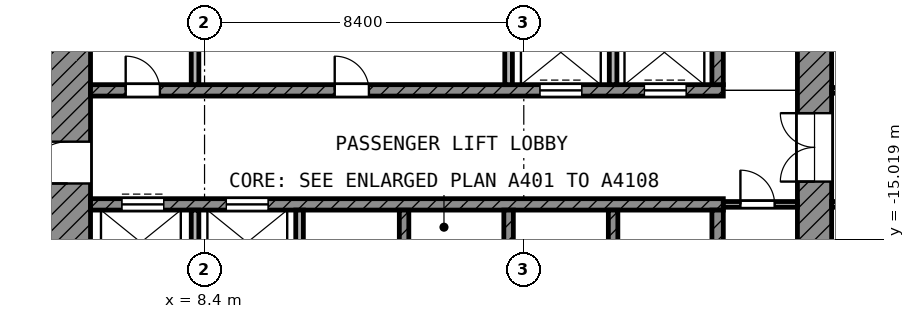
"""IFC4 building model, lengths in metres.
Left out: names, types, materials, properties, quantities, classifications, styles, units other than length and angle.
Written with IfcOpenShell. Run it as: python <this file> out.ifc"""

import sys

from ifc_helpers import new_model, si_unit, direction, frame, frame_2d, origin, place, context, subcontext, project, spatial, rectangle, extrude, element, fill, save


model = new_model("IFC4")
c1 = context("Model", 3, precision=1e-05, world=origin(), true_north=direction((0.0, 1.0)))
c2 = subcontext(c1, "Body", "Model", "MODEL_VIEW")
j1 = project(units=[si_unit("LENGTHUNIT", "METRE"), si_unit("PLANEANGLEUNIT", "RADIAN")], contexts=[c1])
p1 = place(None, origin())
s1 = spatial("IfcSite", under=j1, at=p1, CompositionType="ELEMENT")
p2 = place(p1, origin())
s2 = spatial("IfcBuilding", under=s1, at=p2, CompositionType="ELEMENT")
p3 = place(p2, frame((0.0, 0.0, 208.8)))
s3 = spatial("IfcBuildingStorey", under=s2, at=p3, CompositionType="ELEMENT", Elevation=208.8)
p4 = place(p3, frame((4.8, -24.9, 0.0), z_axis=(0.0, 0.0, 1.0), x_axis=(0.0, 1.0, 0.0)))
e1 = element("IfcWall", 1, at=p4, inside=s3, PredefinedType="SHEAR", context=c2, shape_type="SweptSolid", body=[
    extrude(rectangle(XDim=19.5, YDim=1.2, at=frame_2d((9.75, 0.0))), origin(), (0.0, 0.0, 1.0), 3.7),
])
p5 = place(p4, frame((11.35, 0.0, 0.0)))
e2 = element("IfcOpeningElement", 2, at=p5, cuts=e1, PredefinedType="OPENING", context=c2, shape_type="SweptSolid", body=[
    extrude(rectangle(XDim=1.1, YDim=2.1, at=frame_2d((0.55, 1.05))), frame((0.0, 0.61, 0.0), z_axis=(0.0, -1.0, 0.0), x_axis=(1.0, 0.0, 0.0)), (0.0, 0.0, 1.0), 1.22),
])
p6 = place(p4, frame((2.05, 0.0, 0.0)))
e3 = element("IfcOpeningElement", 3, at=p6, cuts=e1, PredefinedType="OPENING", context=c2, shape_type="SweptSolid", body=[
    extrude(rectangle(XDim=1.1, YDim=2.1, at=frame_2d((0.55, 1.05))), frame((0.0, 0.61, 0.0), z_axis=(0.0, -1.0, 0.0), x_axis=(1.0, 0.0, 0.0)), (0.0, 0.0, 1.0), 1.22),
])
p7 = place(p3, frame((24.45, -24.0, 0.0), z_axis=(0.0, 0.0, 1.0), x_axis=(0.0, 1.0, 0.0)))
e4 = element("IfcWall", 4, at=p7, inside=s3, PredefinedType="SHEAR", context=c2, shape_type="SweptSolid", body=[
    extrude(rectangle(XDim=18.6, YDim=0.9, at=frame_2d((9.3, 0.0))), origin(), (0.0, 0.0, 1.0), 3.7),
])
p8 = place(p7, frame((10.5, 0.0, 0.0)))
e5 = element("IfcOpeningElement", 5, at=p8, cuts=e4, PredefinedType="OPENING", context=c2, shape_type="SweptSolid", body=[
    extrude(rectangle(XDim=1.8, YDim=2.1, at=frame_2d((0.9, 1.05))), frame((0.0, 0.46, 0.0), z_axis=(0.0, -1.0, 0.0), x_axis=(1.0, 0.0, 0.0)), (0.0, 0.0, 1.0), 0.92),
])
p9 = place(p3, frame((5.4, -11.1, 0.0), z_axis=(0.0, 0.0, 1.0), x_axis=(1.0, 0.0, 0.0)))
e6 = element("IfcWall", 6, at=p9, inside=s3, PredefinedType="SHEAR", context=c2, shape_type="SweptSolid", body=[
    extrude(rectangle(XDim=16.65, YDim=0.3, at=frame_2d((8.325, 0.0))), origin(), (0.0, 0.0, 1.0), 3.7),
])
p10 = place(p9, frame((11.825, 0.0, 0.0)))
e7 = element("IfcOpeningElement", 7, at=p10, cuts=e6, PredefinedType="OPENING", context=c2, shape_type="SweptSolid", body=[
    extrude(rectangle(XDim=1.1, YDim=2.1, at=frame_2d((0.55, 1.05))), frame((0.0, 0.16, 0.0), z_axis=(0.0, -1.0, 0.0), x_axis=(1.0, 0.0, 0.0)), (0.0, 0.0, 1.0), 0.32),
])
p11 = place(p9, frame((14.575, 0.0, 0.0)))
e8 = element("IfcOpeningElement", 8, at=p11, cuts=e6, PredefinedType="OPENING", context=c2, shape_type="SweptSolid", body=[
    extrude(rectangle(XDim=1.1, YDim=2.1, at=frame_2d((0.55, 1.05))), frame((0.0, 0.16, 0.0), z_axis=(0.0, -1.0, 0.0), x_axis=(1.0, 0.0, 0.0)), (0.0, 0.0, 1.0), 0.32),
])
p12 = place(p9, frame((0.925, 0.0, 0.0)))
e9 = element("IfcOpeningElement", 9, at=p12, cuts=e6, PredefinedType="OPENING", context=c2, shape_type="SweptSolid", body=[
    extrude(rectangle(XDim=0.9, YDim=2.1, at=frame_2d((0.45, 1.05))), frame((0.0, 0.16, 0.0), z_axis=(0.0, -1.0, 0.0), x_axis=(1.0, 0.0, 0.0)), (0.0, 0.0, 1.0), 0.32),
])
p13 = place(p9, frame((6.425, 0.0, 0.0)))
e10 = element("IfcOpeningElement", 10, at=p13, cuts=e6, PredefinedType="OPENING", context=c2, shape_type="SweptSolid", body=[
    extrude(rectangle(XDim=0.9, YDim=2.1, at=frame_2d((0.45, 1.05))), frame((0.0, 0.16, 0.0), z_axis=(0.0, -1.0, 0.0), x_axis=(1.0, 0.0, 0.0)), (0.0, 0.0, 1.0), 0.32),
])
p14 = place(p3, frame((5.4, -14.1, 0.0), z_axis=(0.0, 0.0, 1.0), x_axis=(1.0, 0.0, 0.0)))
e11 = element("IfcWall", 11, at=p14, inside=s3, PredefinedType="SHEAR", context=c2, shape_type="SweptSolid", body=[
    extrude(rectangle(XDim=16.65, YDim=0.3, at=frame_2d((8.325, 0.0))), origin(), (0.0, 0.0, 1.0), 3.7),
])
p15 = place(p14, frame((0.825, 0.0, 0.0)))
e12 = element("IfcOpeningElement", 12, at=p15, cuts=e11, PredefinedType="OPENING", context=c2, shape_type="SweptSolid", body=[
    extrude(rectangle(XDim=1.1, YDim=2.1, at=frame_2d((0.55, 1.05))), frame((0.0, 0.16, 0.0), z_axis=(0.0, -1.0, 0.0), x_axis=(1.0, 0.0, 0.0)), (0.0, 0.0, 1.0), 0.32),
])
p16 = place(p14, frame((3.575, 0.0, 0.0)))
e13 = element("IfcOpeningElement", 13, at=p16, cuts=e11, PredefinedType="OPENING", context=c2, shape_type="SweptSolid", body=[
    extrude(rectangle(XDim=1.1, YDim=2.1, at=frame_2d((0.55, 1.05))), frame((0.0, 0.16, 0.0), z_axis=(0.0, -1.0, 0.0), x_axis=(1.0, 0.0, 0.0)), (0.0, 0.0, 1.0), 0.32),
])
p17 = place(p3, frame((21.9, -10.95, 0.0), z_axis=(0.0, 0.0, 1.0), x_axis=(0.0, 1.0, 0.0)))
e14 = element("IfcWall", 14, at=p17, inside=s3, PredefinedType="SHEAR", context=c2, shape_type="SweptSolid", body=[
    extrude(rectangle(XDim=2.35, YDim=0.3, at=frame_2d((1.175, 0.0))), origin(), (0.0, 0.0, 1.0), 3.7),
])
p18 = place(p3, frame((21.9, -16.6, 0.0), z_axis=(0.0, 0.0, 1.0), x_axis=(0.0, 1.0, 0.0)))
e15 = element("IfcWall", 15, at=p18, inside=s3, PredefinedType="SHEAR", context=c2, shape_type="SweptSolid", body=[
    extrude(rectangle(XDim=2.35, YDim=0.3, at=frame_2d((1.175, 0.0))), origin(), (0.0, 0.0, 1.0), 3.7),
])
for number, where, z_axis, x_axis in (
    (16, (8.15, -10.95, 0.0), (0.0, 0.0, 1.0), (0.0, 1.0, 0.0)),
    (17, (16.4, -10.95, 0.0), (0.0, 0.0, 1.0), (0.0, 1.0, 0.0)),
    (18, (19.15, -10.95, 0.0), (0.0, 0.0, 1.0), (0.0, 1.0, 0.0)),
):
    element("IfcWall", number, at=place(p3, frame(where, z_axis=z_axis, x_axis=x_axis)), inside=s3, PredefinedType="PARTITIONING", context=c2, shape_type="SweptSolid", body=[
        extrude(rectangle(XDim=2.35, YDim=0.2, at=frame_2d((1.175, 0.0))), origin(), (0.0, 0.0, 1.0), 3.7),
    ])
for number, where, z_axis, x_axis in (
    (19, (8.15, -16.6, 0.0), (0.0, 0.0, 1.0), (0.0, 1.0, 0.0)),
    (20, (10.9, -16.6, 0.0), (0.0, 0.0, 1.0), (0.0, 1.0, 0.0)),
):
    element("IfcWall", number, at=place(p3, frame(where, z_axis=z_axis, x_axis=x_axis)), inside=s3, PredefinedType="PARTITIONING", context=c2, shape_type="SweptSolid", body=[
        extrude(rectangle(XDim=2.35, YDim=0.2, at=frame_2d((1.175, 0.0))), origin(), (0.0, 0.0, 1.0), 3.7),
    ])
for number, where, z_axis, x_axis in (
    (21, (13.65, -16.6, 0.0), (0.0, 0.0, 1.0), (0.0, 1.0, 0.0)),
    (22, (16.4, -16.6, 0.0), (0.0, 0.0, 1.0), (0.0, 1.0, 0.0)),
    (23, (19.15, -16.6, 0.0), (0.0, 0.0, 1.0), (0.0, 1.0, 0.0)),
):
    element("IfcWall", number, at=place(p3, frame(where, z_axis=z_axis, x_axis=x_axis)), inside=s3, PredefinedType="SHEAR", context=c2, shape_type="SweptSolid", body=[
        extrude(rectangle(XDim=2.35, YDim=0.25, at=frame_2d((1.175, 0.0))), origin(), (0.0, 0.0, 1.0), 3.7),
    ])
p19 = place(p3, frame((22.05, -14.1, 0.0), z_axis=(0.0, 0.0, 1.0), x_axis=(1.0, 0.0, 0.0)))
e24 = element("IfcWall", 24, at=p19, inside=s3, PredefinedType="PARTITIONING", context=c2, shape_type="SweptSolid", body=[
    extrude(rectangle(XDim=1.95, YDim=0.15, at=frame_2d((0.975, 0.0))), origin(), (0.0, 0.0, 1.0), 3.7),
])
p20 = place(p19, frame((0.45, 0.0, 0.0)))
e25 = element("IfcOpeningElement", 25, at=p20, cuts=e24, PredefinedType="OPENING", context=c2, shape_type="SweptSolid", body=[
    extrude(rectangle(XDim=0.9, YDim=2.1, at=frame_2d((0.45, 1.05))), frame((0.0, 0.085, 0.0), z_axis=(0.0, -1.0, 0.0), x_axis=(1.0, 0.0, 0.0)), (0.0, 0.0, 1.0), 0.17),
])
p21 = place(p3, frame((24.9, -14.1, 0.0), z_axis=(0.0, 0.0, 1.0), x_axis=(1.0, 0.0, 0.0)))
e26 = element("IfcWall", 26, at=p21, inside=s3, PredefinedType="PARTITIONING", context=c2, shape_type="SweptSolid", body=[
    extrude(rectangle(XDim=4.425, YDim=0.15, at=frame_2d((2.212, 0.0))), origin(), (0.0, 0.0, 1.0), 3.7),
])
p22 = place(p21, frame((1.65, 0.0, 0.0)))
e27 = element("IfcOpeningElement", 27, at=p22, cuts=e26, PredefinedType="OPENING", context=c2, shape_type="SweptSolid", body=[
    extrude(rectangle(XDim=1.5, YDim=2.1, at=frame_2d((0.75, 1.05))), frame((0.0, 0.085, 0.0), z_axis=(0.0, -1.0, 0.0), x_axis=(1.0, 0.0, 0.0)), (0.0, 0.0, 1.0), 0.17),
])
p23 = place(p3, frame((24.9, -11.1, 0.0), z_axis=(0.0, 0.0, 1.0), x_axis=(1.0, 0.0, 0.0)))
e28 = element("IfcWall", 28, at=p23, inside=s3, PredefinedType="PARTITIONING", context=c2, shape_type="SweptSolid", body=[
    extrude(rectangle(XDim=4.498, YDim=0.15, at=frame_2d((2.249, 0.0))), origin(), (0.0, 0.0, 1.0), 3.7),
])
p24 = place(p23, frame((1.5, 0.0, 0.0)))
e29 = element("IfcOpeningElement", 29, at=p24, cuts=e28, PredefinedType="OPENING", context=c2, shape_type="SweptSolid", body=[
    extrude(rectangle(XDim=1.2, YDim=2.1, at=frame_2d((0.6, 1.05))), frame((0.0, 0.085, 0.0), z_axis=(0.0, -1.0, 0.0), x_axis=(1.0, 0.0, 0.0)), (0.0, 0.0, 1.0), 0.17),
])
p25 = place(p10, origin())
e30 = element("IfcDoor", 30, at=p25, inside=s3, OperationType="DOUBLE_DOOR_SLIDING", PredefinedType="DOOR", context=c2, shape_type="SweptSolid", body=[
    extrude(rectangle(XDim=1.1, YDim=2.1, at=frame_2d((0.55, 1.05))), frame((0.0, 0.025, 0.0), z_axis=(0.0, -1.0, 0.0), x_axis=(1.0, 0.0, 0.0)), (0.0, 0.0, 1.0), 0.05),
])
fill(e7, e30)
p26 = place(p11, origin())
e31 = element("IfcDoor", 31, at=p26, inside=s3, OperationType="DOUBLE_DOOR_SLIDING", PredefinedType="DOOR", context=c2, shape_type="SweptSolid", body=[
    extrude(rectangle(XDim=1.1, YDim=2.1, at=frame_2d((0.55, 1.05))), frame((0.0, 0.025, 0.0), z_axis=(0.0, -1.0, 0.0), x_axis=(1.0, 0.0, 0.0)), (0.0, 0.0, 1.0), 0.05),
])
fill(e8, e31)
p27 = place(p15, origin())
e32 = element("IfcDoor", 32, at=p27, inside=s3, OperationType="DOUBLE_DOOR_SLIDING", PredefinedType="DOOR", context=c2, shape_type="SweptSolid", body=[
    extrude(rectangle(XDim=1.1, YDim=2.1, at=frame_2d((0.55, 1.05))), frame((0.0, 0.025, 0.0), z_axis=(0.0, -1.0, 0.0), x_axis=(1.0, 0.0, 0.0)), (0.0, 0.0, 1.0), 0.05),
])
fill(e12, e32)
p28 = place(p16, origin())
e33 = element("IfcDoor", 33, at=p28, inside=s3, OperationType="DOUBLE_DOOR_SLIDING", PredefinedType="DOOR", context=c2, shape_type="SweptSolid", body=[
    extrude(rectangle(XDim=1.1, YDim=2.1, at=frame_2d((0.55, 1.05))), frame((0.0, 0.025, 0.0), z_axis=(0.0, -1.0, 0.0), x_axis=(1.0, 0.0, 0.0)), (0.0, 0.0, 1.0), 0.05),
])
fill(e13, e33)
p29 = place(p5, origin())
e34 = element("IfcDoor", 34, at=p29, inside=s3, OperationType="SINGLE_SWING_LEFT", PredefinedType="DOOR", context=c2, shape_type="SweptSolid", body=[
    extrude(rectangle(XDim=1.1, YDim=2.1, at=frame_2d((0.55, 1.05))), frame((0.0, 0.025, 0.0), z_axis=(0.0, -1.0, 0.0), x_axis=(1.0, 0.0, 0.0)), (0.0, 0.0, 1.0), 0.05),
])
fill(e2, e34)
p30 = place(p8, origin())
e35 = element("IfcDoor", 35, at=p30, inside=s3, OperationType="DOUBLE_DOOR_SINGLE_SWING", PredefinedType="DOOR", context=c2, shape_type="SweptSolid", body=[
    extrude(rectangle(XDim=1.8, YDim=2.1, at=frame_2d((0.9, 1.05))), frame((0.0, 0.025, 0.0), z_axis=(0.0, -1.0, 0.0), x_axis=(1.0, 0.0, 0.0)), (0.0, 0.0, 1.0), 0.05),
])
fill(e5, e35)
p31 = place(p20, origin())
e36 = element("IfcDoor", 36, at=p31, inside=s3, OperationType="SINGLE_SWING_LEFT", PredefinedType="DOOR", context=c2, shape_type="SweptSolid", body=[
    extrude(rectangle(XDim=0.9, YDim=2.1, at=frame_2d((0.45, 1.05))), frame((0.0, 0.025, 0.0), z_axis=(0.0, -1.0, 0.0), x_axis=(1.0, 0.0, 0.0)), (0.0, 0.0, 1.0), 0.05),
])
fill(e25, e36)
p32 = place(p12, origin())
e37 = element("IfcDoor", 37, at=p32, inside=s3, OperationType="SINGLE_SWING_LEFT", PredefinedType="DOOR", context=c2, shape_type="SweptSolid", body=[
    extrude(rectangle(XDim=0.9, YDim=2.1, at=frame_2d((0.45, 1.05))), frame((0.0, 0.025, 0.0), z_axis=(0.0, -1.0, 0.0), x_axis=(1.0, 0.0, 0.0)), (0.0, 0.0, 1.0), 0.05),
])
fill(e9, e37)
p33 = place(p13, origin())
e38 = element("IfcDoor", 38, at=p33, inside=s3, OperationType="SINGLE_SWING_LEFT", PredefinedType="DOOR", context=c2, shape_type="SweptSolid", body=[
    extrude(rectangle(XDim=0.9, YDim=2.1, at=frame_2d((0.45, 1.05))), frame((0.0, 0.025, 0.0), z_axis=(0.0, -1.0, 0.0), x_axis=(1.0, 0.0, 0.0)), (0.0, 0.0, 1.0), 0.05),
])
fill(e10, e38)
save(model, sys.argv[1])
